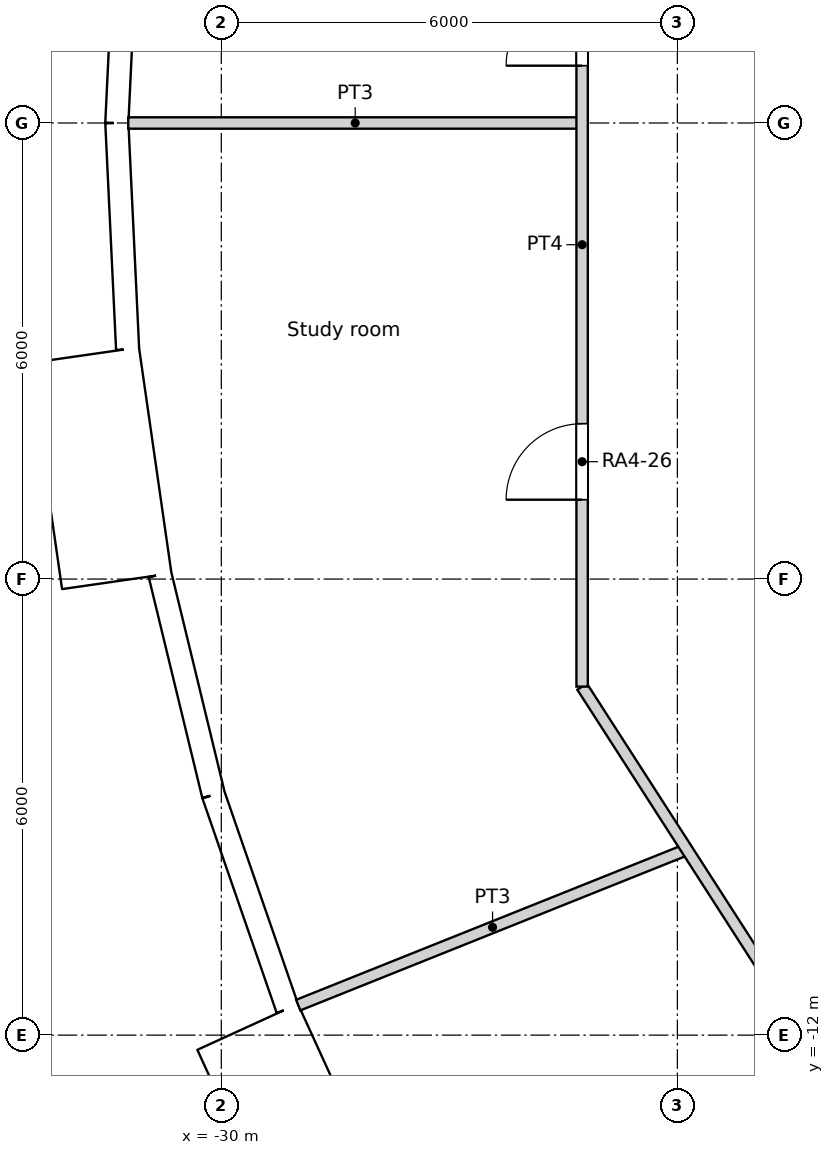
"""IFC4 building model, lengths in metres.
Left out: names, types, materials, properties, quantities, classifications, styles, units other than length and angle.
Written with IfcOpenShell. Run it as: python <this file> out.ifc"""

import sys

from ifc_helpers import new_model, si_unit, direction, frame, frame_2d, origin, origin_2d, place, context, subcontext, project, spatial, rectangle, circle, extrude, element, fill, save


model = new_model("IFC4")
c1 = context("Model", 3, precision=1e-05, world=origin(), true_north=direction((0.0, 1.0)))
c2 = subcontext(c1, "Body", "Model", "MODEL_VIEW")
j1 = project(units=[si_unit("LENGTHUNIT", "METRE"), si_unit("PLANEANGLEUNIT", "RADIAN")], contexts=[c1])
p1 = place(None, origin())
s1 = spatial("IfcSite", under=j1, at=p1, CompositionType="ELEMENT")
p2 = place(p1, origin())
s2 = spatial("IfcBuilding", under=s1, at=p2, CompositionType="ELEMENT")
p3 = place(p2, frame((0.0, 0.0, 60.6)))
s3 = spatial("IfcBuildingStorey", under=s2, at=p3, CompositionType="ELEMENT", Elevation=60.6)
for number, where, z_axis, x_axis in (
    (1, (-30.137, -2.878, 0.0), (0.0, 0.0, 1.0), (1.0, 0.0, 0.0)),
    (2, (-29.048, -8.529, 0.0), (0.0, 0.0, 1.0), (1.0, 0.0, 0.0)),
):
    element("IfcColumn", number, at=place(p3, frame(where, z_axis=z_axis, x_axis=x_axis)), inside=s3, PredefinedType="COLUMN", context=c2, shape_type="SweptSolid", body=[
        extrude(circle(Radius=0.7, at=origin_2d()), origin(), (0.0, 0.0, 1.0), 3.6),
    ])
for number, where, z_axis, x_axis in (
    (3, (-24.382, -2.85, 0.0), (0.0, 0.0, 1.0), (1.0, 0.0, 0.0)),
    (4, (-23.067, -8.396, 0.0), (0.0, 0.0, 1.0), (1.0, 0.0, 0.0)),
):
    element("IfcColumn", number, at=place(p3, frame(where, z_axis=z_axis, x_axis=x_axis)), inside=s3, PredefinedType="COLUMN", context=c2, shape_type="SweptSolid", body=[
        extrude(circle(Radius=0.75, at=origin_2d()), origin(), (0.0, 0.0, 1.0), 3.6),
    ])
p4 = place(p3, frame((-31.233, 2.976, 0.0), z_axis=(0.0, 0.0, 1.0), x_axis=(-0.047604077644, -0.998866283239, 0.0)))
e5 = element("IfcWall", 5, at=p4, inside=s3, PredefinedType="SOLIDWALL", context=c2, shape_type="SweptSolid", body=[
    extrude(rectangle(XDim=2.98, YDim=0.3, at=frame_2d((1.49, 0.0))), origin(), (0.0, 0.0, 1.0), 2.65),
])
p5 = place(p4, frame((1.49, 0.0, 1.55)))
e6 = element("IfcOpeningElement", 6, at=p5, cuts=e5, PredefinedType="OPENING", context=c2, shape_type="SweptSolid", body=[
    extrude(circle(Radius=0.9, at=origin_2d()), frame((0.0, 0.16, 0.0), z_axis=(0.0, -1.0, 0.0), x_axis=(1.0, 0.0, 0.0)), (0.0, 0.0, 1.0), 0.32),
])
p6 = place(p3, frame((-31.375, 0.0, 0.0), z_axis=(0.0, 0.0, 1.0), x_axis=(0.047604077644, -0.998866283239, 0.0)))
e7 = element("IfcWall", 7, at=p6, inside=s3, PredefinedType="SOLIDWALL", context=c2, shape_type="SweptSolid", body=[
    extrude(rectangle(XDim=2.98, YDim=0.3, at=frame_2d((1.49, 0.0))), origin(), (0.0, 0.0, 1.0), 3.15),
])
p7 = place(p6, frame((1.49, 0.0, 1.55)))
e8 = element("IfcOpeningElement", 8, at=p7, cuts=e7, PredefinedType="OPENING", context=c2, shape_type="SweptSolid", body=[
    extrude(circle(Radius=0.9, at=origin_2d()), frame((0.0, 0.16, 0.0), z_axis=(0.0, -1.0, 0.0), x_axis=(1.0, 0.0, 0.0)), (0.0, 0.0, 1.0), 0.32),
])
p8 = place(p3, frame((-31.802, -3.057, -0.45), z_axis=(0.0, 0.0, 1.0), x_axis=(0.142332746704, -0.989818866872, 0.0)))
e9 = element("IfcWall", 9, at=p8, inside=s3, PredefinedType="ELEMENTEDWALL", context=c2, shape_type="SweptSolid", body=[
    extrude(rectangle(XDim=3.0, YDim=1.45, at=frame_2d((1.5, 0.0))), origin(), (0.0, 0.0, 1.0), 3.6),
])
p9 = place(p8, frame((1.5, 0.0, 2.0)))
e10 = element("IfcOpeningElement", 10, at=p9, cuts=e9, PredefinedType="OPENING", context=c2, shape_type="SweptSolid", body=[
    extrude(circle(Radius=0.9, at=origin_2d()), frame((0.0, 0.735, 0.0), z_axis=(0.0, -1.0, 0.0), x_axis=(1.0, 0.0, 0.0)), (0.0, 0.0, 1.0), 1.47),
])
p10 = place(p3, frame((-30.806, -5.944, 0.0), z_axis=(0.0, 0.0, 1.0), x_axis=(0.235743081534, -0.971815414319, 0.0)))
e11 = element("IfcWall", 11, at=p10, inside=s3, PredefinedType="SOLIDWALL", context=c2, shape_type="SweptSolid", body=[
    extrude(rectangle(XDim=2.979, YDim=0.3, at=frame_2d((1.49, 0.0))), origin(), (0.0, 0.0, 1.0), 2.65),
])
p11 = place(p10, frame((1.49, 0.0, 1.55)))
e12 = element("IfcOpeningElement", 12, at=p11, cuts=e11, PredefinedType="OPENING", context=c2, shape_type="SweptSolid", body=[
    extrude(circle(Radius=0.9, at=origin_2d()), frame((0.0, 0.16, 0.0), z_axis=(0.0, -1.0, 0.0), x_axis=(1.0, 0.0, 0.0)), (0.0, 0.0, 1.0), 0.32),
])
p12 = place(p3, frame((-30.104, -8.839, 0.0), z_axis=(0.0, 0.0, 1.0), x_axis=(0.327071167136, -0.944999709856, 0.0)))
e13 = element("IfcWall", 13, at=p12, inside=s3, PredefinedType="SOLIDWALL", context=c2, shape_type="SweptSolid", body=[
    extrude(rectangle(XDim=2.98, YDim=0.3, at=frame_2d((1.49, 0.0))), origin(), (0.0, 0.0, 1.0), 3.15),
])
p13 = place(p12, frame((1.49, 0.0, 1.55)))
e14 = element("IfcOpeningElement", 14, at=p13, cuts=e13, PredefinedType="OPENING", context=c2, shape_type="SweptSolid", body=[
    extrude(circle(Radius=0.9, at=origin_2d()), frame((0.0, 0.16, 0.0), z_axis=(0.0, -1.0, 0.0), x_axis=(1.0, 0.0, 0.0)), (0.0, 0.0, 1.0), 0.32),
])
p14 = place(p3, frame((-29.653, -11.893, -0.45), z_axis=(0.0, 0.0, 1.0), x_axis=(0.415427028395, -0.909626508012, 0.0)))
e15 = element("IfcWall", 15, at=p14, inside=s3, PredefinedType="ELEMENTEDWALL", context=c2, shape_type="SweptSolid", body=[
    extrude(rectangle(XDim=3.0, YDim=1.45, at=frame_2d((1.5, 0.0))), origin(), (0.0, 0.0, 1.0), 3.6),
])
p15 = place(p14, frame((1.5, 0.0, 2.0)))
e16 = element("IfcOpeningElement", 16, at=p15, cuts=e15, PredefinedType="OPENING", context=c2, shape_type="SweptSolid", body=[
    extrude(circle(Radius=0.9, at=origin_2d()), frame((0.0, 0.735, 0.0), z_axis=(0.0, -1.0, 0.0), x_axis=(1.0, 0.0, 0.0)), (0.0, 0.0, 1.0), 1.47),
])
p16 = place(p3, frame((-25.253, -7.415, 0.0), z_axis=(0.0, 0.0, 1.0), x_axis=(0.0, 1.0, 0.0)))
e17 = element("IfcWall", 17, at=p16, inside=s3, PredefinedType="PARTITIONING", context=c2, shape_type="SweptSolid", body=[
    extrude(rectangle(XDim=14.83, YDim=0.15, at=frame_2d((7.415, 0.0))), origin(), (0.0, 0.0, 1.0), 3.15),
])
p17 = place(p16, frame((13.054, 0.0, 0.0)))
e18 = element("IfcOpeningElement", 18, at=p17, cuts=e17, PredefinedType="OPENING", context=c2, shape_type="SweptSolid", body=[
    extrude(rectangle(XDim=1.0, YDim=2.1, at=frame_2d((0.5, 1.05))), frame((0.0, 0.075, 0.0), z_axis=(0.0, -1.0, 0.0), x_axis=(1.0, 0.0, 0.0)), (0.0, 0.0, 1.0), 0.15),
])
p18 = place(p16, frame((8.169, 0.0, 0.0)))
e19 = element("IfcOpeningElement", 19, at=p18, cuts=e17, PredefinedType="OPENING", context=c2, shape_type="SweptSolid", body=[
    extrude(rectangle(XDim=1.0, YDim=2.1, at=frame_2d((0.5, 1.05))), frame((0.0, 0.075, 0.0), z_axis=(0.0, -1.0, 0.0), x_axis=(1.0, 0.0, 0.0)), (0.0, 0.0, 1.0), 0.15),
])
p19 = place(p16, frame((2.459, 0.0, 0.0)))
e20 = element("IfcOpeningElement", 20, at=p19, cuts=e17, PredefinedType="OPENING", context=c2, shape_type="SweptSolid", body=[
    extrude(rectangle(XDim=1.0, YDim=2.04, at=frame_2d((0.5, 1.02))), frame((0.0, 0.075, 0.0), z_axis=(0.0, -1.0, 0.0), x_axis=(1.0, 0.0, 0.0)), (0.0, 0.0, 1.0), 0.15),
])
p20 = place(p3, frame((-25.253, -7.415, 0.0), z_axis=(0.0, 0.0, 1.0), x_axis=(0.540867421004, -0.841107860442, 0.0)))
e21 = element("IfcWall", 21, at=p20, inside=s3, PredefinedType="PARTITIONING", context=c2, shape_type="SweptSolid", body=[
    extrude(rectangle(XDim=14.829, YDim=0.15, at=frame_2d((7.415, 0.0))), origin(), (0.0, 0.0, 1.0), 3.15),
])
p21 = place(p20, frame((8.926, 0.0, 0.0)))
e22 = element("IfcOpeningElement", 22, at=p21, cuts=e21, PredefinedType="OPENING", context=c2, shape_type="SweptSolid", body=[
    extrude(rectangle(XDim=1.8, YDim=2.1, at=frame_2d((0.9, 1.05))), frame((0.0, 0.075, 0.0), z_axis=(0.0, -1.0, 0.0), x_axis=(1.0, 0.0, 0.0)), (0.0, 0.0, 1.0), 0.15),
])
p22 = place(p3, frame((-31.224, 0.0, 0.0), z_axis=(0.0, 0.0, 1.0), x_axis=(1.0, 0.0, 0.0)))
e23 = element("IfcWall", 23, at=p22, inside=s3, PredefinedType="PARTITIONING", context=c2, shape_type="SweptSolid", body=[
    extrude(rectangle(XDim=5.971, YDim=0.15, at=frame_2d((2.986, 0.0))), origin(), (0.0, 0.0, 1.0), 3.15),
])
p23 = place(p3, frame((-28.988, -11.605, 0.0), z_axis=(0.0, 0.0, 1.0), x_axis=(0.928372711727, 0.371650518795, 0.0)))
e24 = element("IfcWall", 24, at=p23, inside=s3, PredefinedType="PARTITIONING", context=c2, shape_type="SweptSolid", body=[
    extrude(rectangle(XDim=5.508, YDim=0.15, at=frame_2d((2.754, 0.0))), origin(), (0.0, 0.0, 1.0), 3.15),
])
p24 = place(p5, origin())
e25 = element("IfcWindow", 25, at=p24, inside=s3, PartitioningType="SINGLE_PANEL", PredefinedType="WINDOW", context=c2, shape_type="SweptSolid", body=[
    extrude(circle(Radius=0.9, at=origin_2d()), frame((0.0, 0.12, 0.0), z_axis=(0.0, -1.0, 0.0), x_axis=(1.0, 0.0, 0.0)), (0.0, 0.0, 1.0), 0.1),
])
fill(e6, e25)
p25 = place(p7, origin())
e26 = element("IfcWindow", 26, at=p25, inside=s3, PartitioningType="SINGLE_PANEL", PredefinedType="WINDOW", context=c2, shape_type="SweptSolid", body=[
    extrude(circle(Radius=0.9, at=origin_2d()), frame((0.0, 0.12, 0.0), z_axis=(0.0, -1.0, 0.0), x_axis=(1.0, 0.0, 0.0)), (0.0, 0.0, 1.0), 0.1),
])
fill(e8, e26)
p26 = place(p9, origin())
e27 = element("IfcWindow", 27, at=p26, inside=s3, PartitioningType="SINGLE_PANEL", PredefinedType="WINDOW", context=c2, shape_type="SweptSolid", body=[
    extrude(circle(Radius=0.9, at=origin_2d()), frame((0.0, 0.695, 0.0), z_axis=(0.0, -1.0, 0.0), x_axis=(1.0, 0.0, 0.0)), (0.0, 0.0, 1.0), 0.1),
])
fill(e10, e27)
p27 = place(p11, origin())
e28 = element("IfcWindow", 28, at=p27, inside=s3, PartitioningType="SINGLE_PANEL", PredefinedType="WINDOW", context=c2, shape_type="SweptSolid", body=[
    extrude(circle(Radius=0.9, at=origin_2d()), frame((0.0, 0.12, 0.0), z_axis=(0.0, -1.0, 0.0), x_axis=(1.0, 0.0, 0.0)), (0.0, 0.0, 1.0), 0.1),
])
fill(e12, e28)
p28 = place(p13, origin())
e29 = element("IfcWindow", 29, at=p28, inside=s3, PartitioningType="SINGLE_PANEL", PredefinedType="WINDOW", context=c2, shape_type="SweptSolid", body=[
    extrude(circle(Radius=0.9, at=origin_2d()), frame((0.0, 0.12, 0.0), z_axis=(0.0, -1.0, 0.0), x_axis=(1.0, 0.0, 0.0)), (0.0, 0.0, 1.0), 0.1),
])
fill(e14, e29)
p29 = place(p15, origin())
e30 = element("IfcWindow", 30, at=p29, inside=s3, PartitioningType="SINGLE_PANEL", PredefinedType="WINDOW", context=c2, shape_type="SweptSolid", body=[
    extrude(circle(Radius=0.9, at=origin_2d()), frame((0.0, 0.695, 0.0), z_axis=(0.0, -1.0, 0.0), x_axis=(1.0, 0.0, 0.0)), (0.0, 0.0, 1.0), 0.1),
])
fill(e16, e30)
p30 = place(p18, origin())
e31 = element("IfcDoor", 31, at=p30, inside=s3, OperationType="SINGLE_SWING_LEFT", PredefinedType="DOOR", context=c2, shape_type="SweptSolid", body=[
    extrude(rectangle(XDim=1.0, YDim=2.1, at=frame_2d((0.5, 1.05))), frame((0.0, 0.025, 0.0), z_axis=(0.0, -1.0, 0.0), x_axis=(1.0, 0.0, 0.0)), (0.0, 0.0, 1.0), 0.05),
])
fill(e19, e31)
p31 = place(p19, origin())
e32 = element("IfcDoor", 32, at=p31, inside=s3, OperationType="SINGLE_SWING_LEFT", PredefinedType="DOOR", context=c2, shape_type="SweptSolid", body=[
    extrude(rectangle(XDim=1.0, YDim=2.04, at=frame_2d((0.5, 1.02))), frame((0.0, 0.025, 0.0), z_axis=(0.0, -1.0, 0.0), x_axis=(1.0, 0.0, 0.0)), (0.0, 0.0, 1.0), 0.05),
])
fill(e20, e32)
save(model, sys.argv[1])
